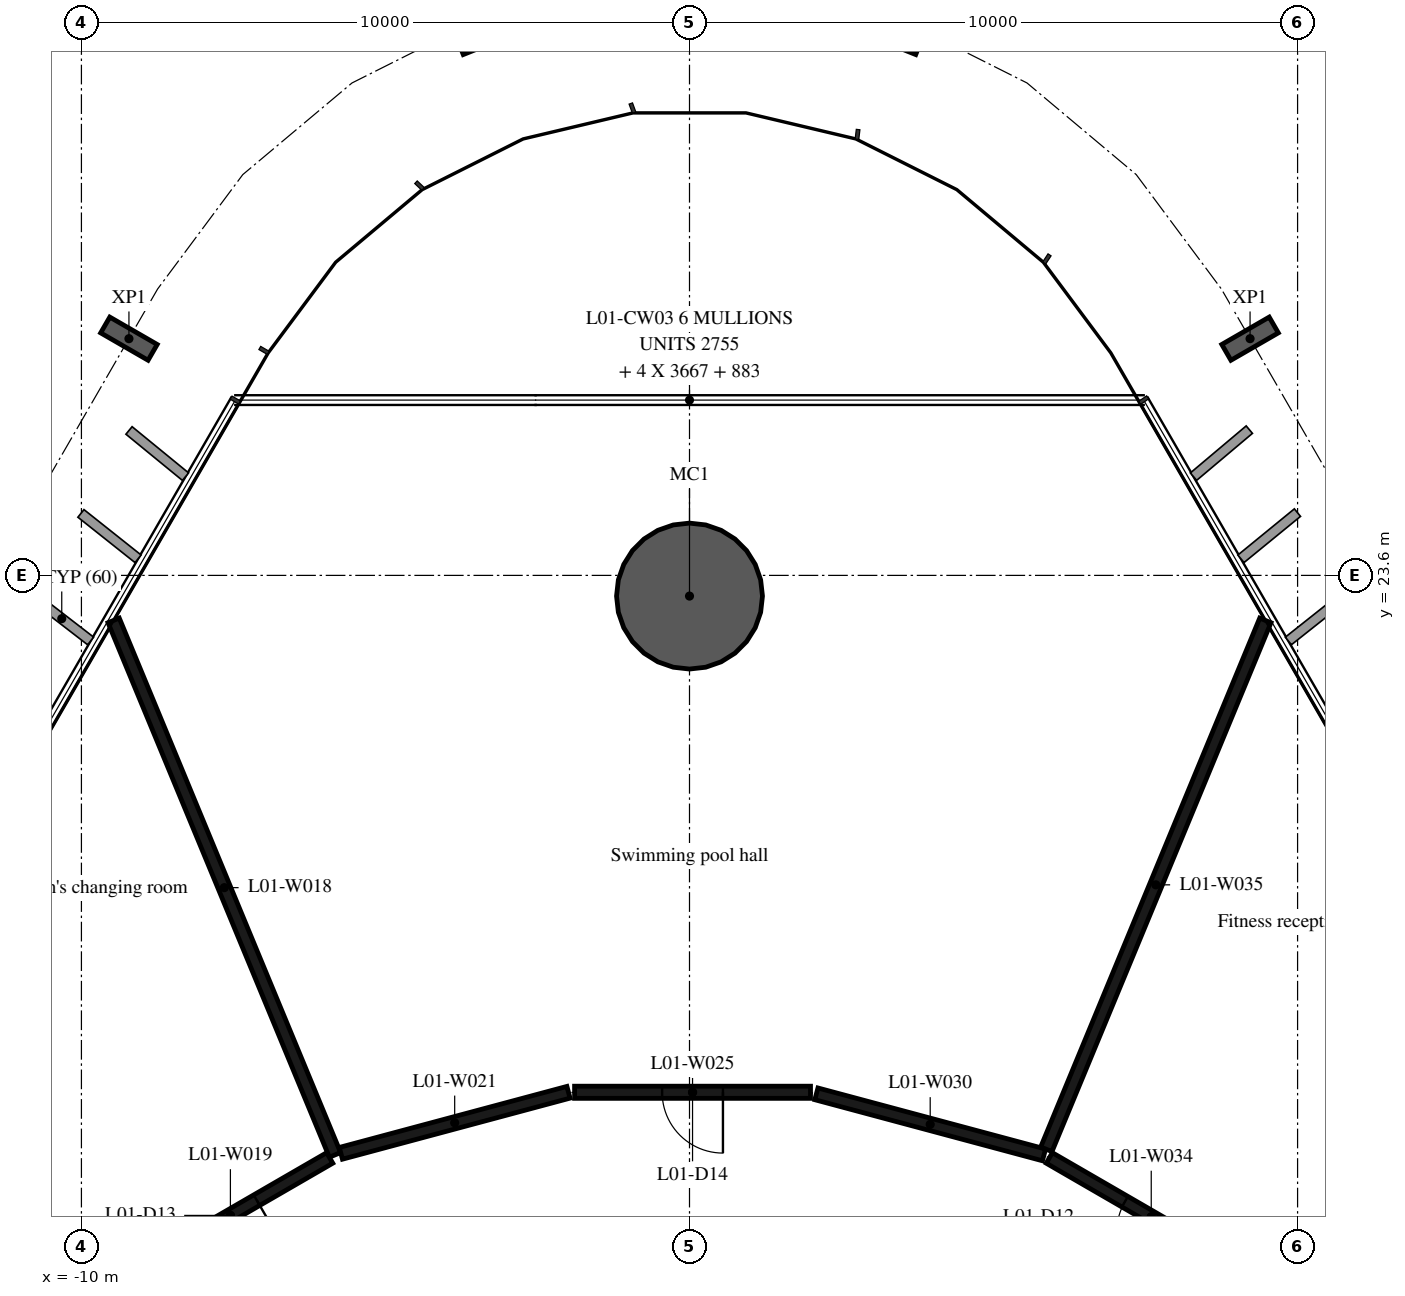
"""IFC4 building model, lengths in metres.
Left out: names, types, materials, properties, quantities, classifications, styles, units other than length and angle.
Written with IfcOpenShell. Run it as: python <this file> out.ifc"""

import sys

from ifc_helpers import new_model, si_unit, direction, frame, frame_2d, origin, origin_2d, place, context, subcontext, project, spatial, rectangle, hollow_circle, i_section, extrude, element, fill, save


model = new_model("IFC4")
c1 = context("Model", 3, precision=1e-05, world=origin(), true_north=direction((0.0, 1.0)))
c2 = subcontext(c1, "Body", "Model", "MODEL_VIEW")
j1 = project(units=[si_unit("LENGTHUNIT", "METRE"), si_unit("PLANEANGLEUNIT", "RADIAN")], contexts=[c1])
p1 = place(None, origin())
s1 = spatial("IfcSite", under=j1, at=p1, CompositionType="ELEMENT")
p2 = place(p1, origin())
s2 = spatial("IfcBuilding", under=s1, at=p2, CompositionType="ELEMENT")
p3 = place(p2, frame((0.0, 0.0, 9.0)))
s3 = spatial("IfcBuildingStorey", under=s2, at=p3, CompositionType="ELEMENT", Elevation=9.0)
p4 = place(p3, frame((0.0, 23.26, -0.38), z_axis=(0.0, 0.0, 1.0), x_axis=(1.0, 0.0, 0.0)))
e1 = element("IfcColumn", 1, at=p4, inside=s3, PredefinedType="COLUMN", context=c2, shape_type="SweptSolid", body=[
    extrude(hollow_circle(Radius=1.2, WallThickness=0.06, at=origin_2d()), origin(), (0.0, 0.0, 1.0), 4.8),
])
for number, where, z_axis, x_axis in (
    (2, (9.219, 27.493, -0.38), (0.0, 0.0, 1.0), (0.5, -0.866, 0.0)),
    (3, (3.748, 32.639, -0.38), (0.0, 0.0, 1.0), (0.929, -0.371, 0.0)),
    (4, (-3.748, 32.639, -0.38), (0.0, 0.0, 1.0), (0.929, 0.371, 0.0)),
    (5, (-9.219, 27.493, -0.38), (0.0, 0.0, 1.0), (0.5, 0.866, 0.0)),
):
    element("IfcColumn", number, at=place(p3, frame(where, z_axis=z_axis, x_axis=x_axis)), inside=s3, PredefinedType="COLUMN", context=c2, shape_type="SweptSolid", body=[
        extrude(i_section(OverallWidth=0.3, OverallDepth=0.9, WebThickness=0.019, FlangeThickness=0.035, FilletRadius=0.03, at=origin_2d()), origin(), (0.0, 0.0, 1.0), 4.8),
    ])
p5 = place(p3, frame((-5.83, 14.07, 0.0), z_axis=(0.0, 0.0, 1.0), x_axis=(-0.382588257379, 0.923918949538, 0.0)))
e6 = element("IfcWall", 6, at=p5, inside=s3, PredefinedType="PARTITIONING", context=c2, shape_type="SweptSolid", body=[
    extrude(rectangle(XDim=9.514, YDim=0.2, at=frame_2d((4.757, 0.0))), origin(), (0.0, 0.0, 1.0), 4.42),
])
p6 = place(p3, frame((-5.917, 14.02, 0.0), z_axis=(0.0, 0.0, 1.0), x_axis=(-0.865591582237, -0.500750649286, 0.0)))
e7 = element("IfcWall", 7, at=p6, inside=s3, PredefinedType="PARTITIONING", context=c2, shape_type="SweptSolid", body=[
    extrude(rectangle(XDim=3.774, YDim=0.2, at=frame_2d((1.887, 0.0))), origin(), (0.0, 0.0, 1.0), 4.42),
])
p7 = place(p6, frame((1.387, 0.0, 0.0)))
e8 = element("IfcOpeningElement", 8, at=p7, cuts=e7, PredefinedType="OPENING", context=c2, shape_type="SweptSolid", body=[
    extrude(rectangle(XDim=1.0, YDim=2.1, at=frame_2d((0.5, 1.05))), frame((0.0, 0.11, 0.0), z_axis=(0.0, -1.0, 0.0), x_axis=(1.0, 0.0, 0.0)), (0.0, 0.0, 1.0), 0.22),
])
p8 = place(p3, frame((-1.99, 15.1, 0.0), z_axis=(0.0, 0.0, 1.0), x_axis=(-0.96585437197, -0.259085569159, 0.0)))
e9 = element("IfcWall", 9, at=p8, inside=s3, PredefinedType="PARTITIONING", context=c2, shape_type="SweptSolid", body=[
    extrude(rectangle(XDim=3.876, YDim=0.2, at=frame_2d((1.938, 0.0))), origin(), (0.0, 0.0, 1.0), 4.42),
])
p9 = place(p3, frame((1.99, 15.1, 0.0), z_axis=(0.0, 0.0, 1.0), x_axis=(-1.0, 0.0, 0.0)))
e10 = element("IfcWall", 10, at=p9, inside=s3, PredefinedType="PARTITIONING", context=c2, shape_type="SweptSolid", body=[
    extrude(rectangle(XDim=3.88, YDim=0.2, at=frame_2d((1.94, 0.0))), origin(), (0.0, 0.0, 1.0), 4.42),
])
p10 = place(p9, frame((1.44, 0.0, 0.0)))
e11 = element("IfcOpeningElement", 11, at=p10, cuts=e10, PredefinedType="OPENING", context=c2, shape_type="SweptSolid", body=[
    extrude(rectangle(XDim=1.0, YDim=2.1, at=frame_2d((0.5, 1.05))), frame((0.0, 0.11, 0.0), z_axis=(0.0, -1.0, 0.0), x_axis=(1.0, 0.0, 0.0)), (0.0, 0.0, 1.0), 0.22),
])
p11 = place(p3, frame((5.83, 14.07, 0.0), z_axis=(0.0, 0.0, 1.0), x_axis=(-0.965870133458, 0.259026804199, 0.0)))
e12 = element("IfcWall", 12, at=p11, inside=s3, PredefinedType="PARTITIONING", context=c2, shape_type="SweptSolid", body=[
    extrude(rectangle(XDim=3.876, YDim=0.2, at=frame_2d((1.938, 0.0))), origin(), (0.0, 0.0, 1.0), 4.42),
])
p12 = place(p3, frame((9.27, 12.08, 0.0), z_axis=(0.0, 0.0, 1.0), x_axis=(-0.865601686425, 0.500733182901, 0.0)))
e13 = element("IfcWall", 13, at=p12, inside=s3, PredefinedType="PARTITIONING", context=c2, shape_type="SweptSolid", body=[
    extrude(rectangle(XDim=3.874, YDim=0.2, at=frame_2d((1.937, 0.0))), origin(), (0.0, 0.0, 1.0), 4.42),
])
p13 = place(p12, frame((1.437, 0.0, 0.0)))
e14 = element("IfcOpeningElement", 14, at=p13, cuts=e13, PredefinedType="OPENING", context=c2, shape_type="SweptSolid", body=[
    extrude(rectangle(XDim=1.0, YDim=2.1, at=frame_2d((0.5, 1.05))), frame((0.0, 0.11, 0.0), z_axis=(0.0, -1.0, 0.0), x_axis=(1.0, 0.0, 0.0)), (0.0, 0.0, 1.0), 0.22),
])
p14 = place(p3, frame((9.47, 22.86, 0.0), z_axis=(0.0, 0.0, 1.0), x_axis=(-0.382599926304, -0.923914117433, 0.0)))
e15 = element("IfcWall", 15, at=p14, inside=s3, PredefinedType="PARTITIONING", context=c2, shape_type="SweptSolid", body=[
    extrude(rectangle(XDim=9.414, YDim=0.2, at=frame_2d((4.707, 0.0))), origin(), (0.0, 0.0, 1.0), 4.42),
])
p15 = place(p13, origin())
e16 = element("IfcDoor", 16, at=p15, inside=s3, OperationType="SINGLE_SWING_LEFT", PredefinedType="DOOR", context=c2, shape_type="SweptSolid", body=[
    extrude(rectangle(XDim=1.0, YDim=2.1, at=frame_2d((0.5, 1.05))), frame((0.0, 0.025, 0.0), z_axis=(0.0, -1.0, 0.0), x_axis=(1.0, 0.0, 0.0)), (0.0, 0.0, 1.0), 0.05),
])
fill(e14, e16)
p16 = place(p7, origin())
e17 = element("IfcDoor", 17, at=p16, inside=s3, OperationType="SINGLE_SWING_LEFT", PredefinedType="DOOR", context=c2, shape_type="SweptSolid", body=[
    extrude(rectangle(XDim=1.0, YDim=2.1, at=frame_2d((0.5, 1.05))), frame((0.0, 0.025, 0.0), z_axis=(0.0, -1.0, 0.0), x_axis=(1.0, 0.0, 0.0)), (0.0, 0.0, 1.0), 0.05),
])
fill(e8, e17)
p17 = place(p10, origin())
e18 = element("IfcDoor", 18, at=p17, inside=s3, OperationType="SINGLE_SWING_LEFT", PredefinedType="DOOR", context=c2, shape_type="SweptSolid", body=[
    extrude(rectangle(XDim=1.0, YDim=2.1, at=frame_2d((0.5, 1.05))), frame((0.0, 0.025, 0.0), z_axis=(0.0, -1.0, 0.0), x_axis=(1.0, 0.0, 0.0)), (0.0, 0.0, 1.0), 0.05),
])
fill(e11, e18)
save(model, sys.argv[1])
